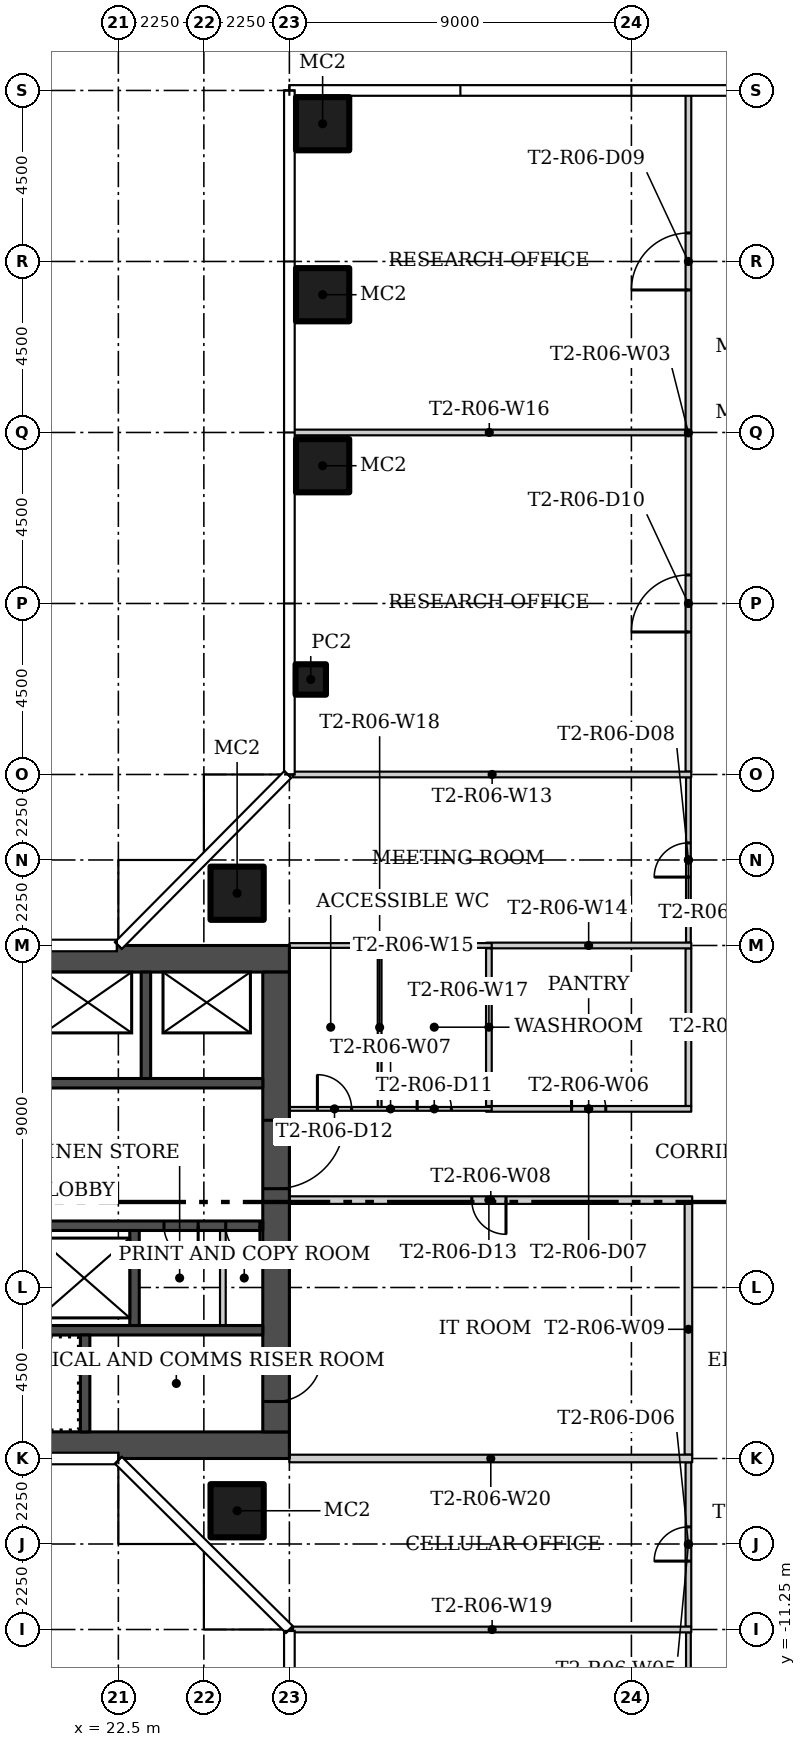
"""IFC4 building model, lengths in metres.
Left out: names, types, materials, properties, quantities, classifications, styles, units other than length and angle.
Written with IfcOpenShell. Run it as: python <this file> out.ifc"""

import sys

from ifc_helpers import new_model, si_unit, direction, frame, frame_2d, origin, origin_2d, place, context, subcontext, project, spatial, rectangle, hollow_rectangle, extrude, element, fill, save


model = new_model("IFC4")
c1 = context("Model", 3, precision=1e-05, world=origin(), true_north=direction((0.0, 1.0)))
c2 = subcontext(c1, "Body", "Model", "MODEL_VIEW")
j1 = project(units=[si_unit("LENGTHUNIT", "METRE"), si_unit("PLANEANGLEUNIT", "RADIAN")], contexts=[c1])
p1 = place(None, origin())
s1 = spatial("IfcSite", under=j1, at=p1, CompositionType="ELEMENT")
p2 = place(p1, origin())
s2 = spatial("IfcBuilding", under=s1, at=p2, CompositionType="ELEMENT")
p3 = place(p2, frame((0.0, 0.0, 61.5)))
s3 = spatial("IfcBuildingStorey", under=s2, at=p3, CompositionType="ELEMENT", Elevation=61.5)
for number, where in (
    (1, (25.625, 8.125, 0.0)),
    (2, (25.625, -8.125, 0.0)),
):
    element("IfcColumn", number, at=place(p3, frame(where)), inside=s3, PredefinedType="COLUMN", context=c2, shape_type="SweptSolid", body=[
        extrude(hollow_rectangle(XDim=1.4, YDim=1.4, WallThickness=0.05, at=origin_2d()), origin(), (0.0, 0.0, 1.0), 3.55),
    ])
p4 = place(p3, frame((27.562, 13.75, 0.0)))
e3 = element("IfcColumn", 3, at=p4, inside=s3, PredefinedType="COLUMN", context=c2, shape_type="SweptSolid", body=[
    extrude(hollow_rectangle(XDim=0.8, YDim=0.8, WallThickness=0.025, at=origin_2d()), origin(), (0.0, 0.0, 1.0), 3.55),
])
for number, where in (
    (4, (27.875, 19.375, 0.0)),
    (5, (27.875, 23.875, 0.0)),
    (6, (27.875, 28.375, 0.0)),
):
    element("IfcColumn", number, at=place(p3, frame(where)), inside=s3, PredefinedType="COLUMN", context=c2, shape_type="SweptSolid", body=[
        extrude(hollow_rectangle(XDim=1.4, YDim=1.4, WallThickness=0.05, at=origin_2d()), origin(), (0.0, 0.0, 1.0), 3.55),
    ])
p5 = place(p3, frame((37.5, 6.825, 0.0), z_axis=(0.0, 0.0, 1.0), x_axis=(0.0, 1.0, 0.0)))
e7 = element("IfcWall", 7, at=p5, inside=s3, PredefinedType="PARTITIONING", context=c2, shape_type="SweptSolid", body=[
    extrude(rectangle(XDim=4.35, YDim=0.125, at=frame_2d((2.175, 0.0))), origin(), (0.0, 0.0, 1.0), 3.55),
])
p6 = place(p5, frame((1.725, 0.0, 0.0)))
e8 = element("IfcOpeningElement", 8, at=p6, cuts=e7, PredefinedType="OPENING", context=c2, shape_type="SweptSolid", body=[
    extrude(rectangle(XDim=0.9, YDim=2.1, at=frame_2d((0.45, 1.05))), frame((0.0, 0.073, 0.0), z_axis=(0.0, -1.0, 0.0), x_axis=(1.0, 0.0, 0.0)), (0.0, 0.0, 1.0), 0.145),
])
p7 = place(p3, frame((37.5, -24.655, 0.0), z_axis=(0.0, 0.0, 1.0), x_axis=(0.0, 1.0, 0.0)))
e9 = element("IfcWall", 9, at=p7, inside=s3, PredefinedType="PARTITIONING", context=c2, shape_type="SweptSolid", body=[
    extrude(rectangle(XDim=13.33, YDim=0.125, at=frame_2d((6.665, 0.0))), origin(), (0.0, 0.0, 1.0), 3.55),
])
p8 = place(p7, frame((5.905, 0.0, 0.0)))
e10 = element("IfcOpeningElement", 10, at=p8, cuts=e9, PredefinedType="OPENING", context=c2, shape_type="SweptSolid", body=[
    extrude(rectangle(XDim=1.5, YDim=2.1, at=frame_2d((0.75, 1.05))), frame((0.0, 0.073, 0.0), z_axis=(0.0, -1.0, 0.0), x_axis=(1.0, 0.0, 0.0)), (0.0, 0.0, 1.0), 0.145),
])
p9 = place(p3, frame((37.5, 11.325, 0.0), z_axis=(0.0, 0.0, 1.0), x_axis=(0.0, 1.0, 0.0)))
e11 = element("IfcWall", 11, at=p9, inside=s3, PredefinedType="PARTITIONING", context=c2, shape_type="SweptSolid", body=[
    extrude(rectangle(XDim=17.83, YDim=0.15, at=frame_2d((8.915, 0.0))), origin(), (0.0, 0.0, 1.0), 3.55),
])
p10 = place(p9, frame((12.675, 0.0, 0.0)))
e12 = element("IfcOpeningElement", 12, at=p10, cuts=e11, PredefinedType="OPENING", context=c2, shape_type="SweptSolid", body=[
    extrude(rectangle(XDim=1.5, YDim=2.1, at=frame_2d((0.75, 1.05))), frame((0.0, 0.085, 0.0), z_axis=(0.0, -1.0, 0.0), x_axis=(1.0, 0.0, 0.0)), (0.0, 0.0, 1.0), 0.17),
])
p11 = place(p9, frame((3.675, 0.0, 0.0)))
e13 = element("IfcOpeningElement", 13, at=p11, cuts=e11, PredefinedType="OPENING", context=c2, shape_type="SweptSolid", body=[
    extrude(rectangle(XDim=1.5, YDim=2.1, at=frame_2d((0.75, 1.05))), frame((0.0, 0.085, 0.0), z_axis=(0.0, -1.0, 0.0), x_axis=(1.0, 0.0, 0.0)), (0.0, 0.0, 1.0), 0.17),
])
p12 = place(p3, frame((37.5, 2.525, 0.0), z_axis=(0.0, 0.0, 1.0), x_axis=(0.0, 1.0, 0.0)))
e14 = element("IfcWall", 14, at=p12, inside=s3, PredefinedType="PARTITIONING", context=c2, shape_type="SweptSolid", body=[
    extrude(rectangle(XDim=4.15, YDim=0.15, at=frame_2d((2.075, 0.0))), origin(), (0.0, 0.0, 1.0), 3.55),
])
p13 = place(p3, frame((37.5, -11.175, 0.0), z_axis=(0.0, 0.0, 1.0), x_axis=(0.0, 1.0, 0.0)))
e15 = element("IfcWall", 15, at=p13, inside=s3, PredefinedType="PARTITIONING", context=c2, shape_type="SweptSolid", body=[
    extrude(rectangle(XDim=4.325, YDim=0.15, at=frame_2d((2.163, 0.0))), origin(), (0.0, 0.0, 1.0), 3.55),
])
p14 = place(p13, frame((1.725, 0.0, 0.0)))
e16 = element("IfcOpeningElement", 16, at=p14, cuts=e15, PredefinedType="OPENING", context=c2, shape_type="SweptSolid", body=[
    extrude(rectangle(XDim=0.9, YDim=2.1, at=frame_2d((0.45, 1.05))), frame((0.0, 0.085, 0.0), z_axis=(0.0, -1.0, 0.0), x_axis=(1.0, 0.0, 0.0)), (0.0, 0.0, 1.0), 0.17),
])
p15 = place(p3, frame((32.175, 2.45, 0.0)))
e17 = element("IfcWall", 17, at=p15, inside=s3, PredefinedType="PARTITIONING", context=c2, shape_type="SweptSolid", body=[
    extrude(rectangle(XDim=5.4, YDim=0.15, at=frame_2d((2.7, 0.0))), origin(), (0.0, 0.0, 1.0), 3.55),
])
p16 = place(p15, frame((2.25, 0.0, 0.0)))
e18 = element("IfcOpeningElement", 18, at=p16, cuts=e17, PredefinedType="OPENING", context=c2, shape_type="SweptSolid", body=[
    extrude(rectangle(XDim=0.9, YDim=2.1, at=frame_2d((0.45, 1.05))), frame((0.0, 0.085, 0.0), z_axis=(0.0, -1.0, 0.0), x_axis=(1.0, 0.0, 0.0)), (0.0, 0.0, 1.0), 0.17),
])
p17 = place(p3, frame((27.0, 2.45, 0.0)))
e19 = element("IfcWall", 19, at=p17, inside=s3, PredefinedType="PARTITIONING", context=c2, shape_type="SweptSolid", body=[
    extrude(rectangle(XDim=5.325, YDim=0.1, at=frame_2d((2.663, 0.0))), origin(), (0.0, 0.0, 1.0), 3.55),
])
p18 = place(p17, frame((3.363, 0.0, 0.0)))
e20 = element("IfcOpeningElement", 20, at=p18, cuts=e19, PredefinedType="OPENING", context=c2, shape_type="SweptSolid", body=[
    extrude(rectangle(XDim=0.9, YDim=2.1, at=frame_2d((0.45, 1.05))), frame((0.0, 0.06, 0.0), z_axis=(0.0, -1.0, 0.0), x_axis=(1.0, 0.0, 0.0)), (0.0, 0.0, 1.0), 0.12),
])
p19 = place(p17, frame((0.738, 0.0, 0.0)))
e21 = element("IfcOpeningElement", 21, at=p19, cuts=e19, PredefinedType="OPENING", context=c2, shape_type="SweptSolid", body=[
    extrude(rectangle(XDim=0.9, YDim=2.1, at=frame_2d((0.45, 1.05))), frame((0.0, 0.06, 0.0), z_axis=(0.0, -1.0, 0.0), x_axis=(1.0, 0.0, 0.0)), (0.0, 0.0, 1.0), 0.12),
])
p20 = place(p3, frame((37.6, 0.05, 0.0), z_axis=(0.0, 0.0, 1.0), x_axis=(-1.0, 0.0, 0.0)))
e22 = element("IfcWall", 22, at=p20, inside=s3, PredefinedType="PARTITIONING", context=c2, shape_type="SweptSolid", body=[
    extrude(rectangle(XDim=10.6, YDim=0.2, at=frame_2d((5.3, 0.0))), origin(), (0.0, 0.0, 1.0), 3.55),
])
p21 = place(p20, frame((4.9, 0.0, 0.0)))
e23 = element("IfcOpeningElement", 23, at=p21, cuts=e22, PredefinedType="OPENING", context=c2, shape_type="SweptSolid", body=[
    extrude(rectangle(XDim=0.9, YDim=2.1, at=frame_2d((0.45, 1.05))), frame((0.0, 0.11, 0.0), z_axis=(0.0, -1.0, 0.0), x_axis=(1.0, 0.0, 0.0)), (0.0, 0.0, 1.0), 0.22),
])
p22 = place(p3, frame((37.5, -6.65, 0.0), z_axis=(0.0, 0.0, 1.0), x_axis=(0.0, 1.0, 0.0)))
e24 = element("IfcWall", 24, at=p22, inside=s3, PredefinedType="PARTITIONING", context=c2, shape_type="SweptSolid", body=[
    extrude(rectangle(XDim=6.6, YDim=0.2, at=frame_2d((3.3, 0.0))), origin(), (0.0, 0.0, 1.0), 3.55),
])
p23 = place(p3, frame((37.575, 11.25, 0.0), z_axis=(0.0, 0.0, 1.0), x_axis=(-1.0, 0.0, 0.0)))
e25 = element("IfcWall", 25, at=p23, inside=s3, PredefinedType="PARTITIONING", context=c2, shape_type="SweptSolid", body=[
    extrude(rectangle(XDim=10.48, YDim=0.15, at=frame_2d((5.24, 0.0))), origin(), (0.0, 0.0, 1.0), 3.55),
])
p24 = place(p3, frame((32.175, 6.75, 0.0)))
e26 = element("IfcWall", 26, at=p24, inside=s3, PredefinedType="PARTITIONING", context=c2, shape_type="SweptSolid", body=[
    extrude(rectangle(XDim=5.4, YDim=0.15, at=frame_2d((2.7, 0.0))), origin(), (0.0, 0.0, 1.0), 3.55),
])
p25 = place(p3, frame((27.0, 6.75, 0.0)))
e27 = element("IfcWall", 27, at=p25, inside=s3, PredefinedType="PARTITIONING", context=c2, shape_type="SweptSolid", body=[
    extrude(rectangle(XDim=5.325, YDim=0.125, at=frame_2d((2.663, 0.0))), origin(), (0.0, 0.0, 1.0), 3.55),
])
p26 = place(p3, frame((37.425, 20.25, 0.0), z_axis=(0.0, 0.0, 1.0), x_axis=(-1.0, 0.0, 0.0)))
e28 = element("IfcWall", 28, at=p26, inside=s3, PredefinedType="PARTITIONING", context=c2, shape_type="SweptSolid", body=[
    extrude(rectangle(XDim=10.33, YDim=0.15, at=frame_2d((5.165, 0.0))), origin(), (0.0, 0.0, 1.0), 3.55),
])
p27 = place(p3, frame((32.25, 6.675, 0.0), z_axis=(0.0, 0.0, 1.0), x_axis=(0.0, -1.0, 0.0)))
e29 = element("IfcWall", 29, at=p27, inside=s3, PredefinedType="PARTITIONING", context=c2, shape_type="SweptSolid", body=[
    extrude(rectangle(XDim=4.15, YDim=0.15, at=frame_2d((2.075, 0.0))), origin(), (0.0, 0.0, 1.0), 3.55),
])
p28 = place(p3, frame((29.375, 6.688, 0.0), z_axis=(0.0, 0.0, 1.0), x_axis=(0.0, -1.0, 0.0)))
e30 = element("IfcWall", 30, at=p28, inside=s3, PredefinedType="PARTITIONING", context=c2, shape_type="SweptSolid", body=[
    extrude(rectangle(XDim=4.187, YDim=0.1, at=frame_2d((2.094, 0.0))), origin(), (0.0, 0.0, 1.0), 3.55),
])
p29 = place(p3, frame((27.095, -11.25, 0.0)))
e31 = element("IfcWall", 31, at=p29, inside=s3, PredefinedType="PARTITIONING", context=c2, shape_type="SweptSolid", body=[
    extrude(rectangle(XDim=10.48, YDim=0.15, at=frame_2d((5.24, 0.0))), origin(), (0.0, 0.0, 1.0), 3.55),
])
p30 = place(p3, frame((37.6, -6.75, 0.0), z_axis=(0.0, 0.0, 1.0), x_axis=(-1.0, 0.0, 0.0)))
e32 = element("IfcWall", 32, at=p30, inside=s3, PredefinedType="PARTITIONING", context=c2, shape_type="SweptSolid", body=[
    extrude(rectangle(XDim=10.6, YDim=0.2, at=frame_2d((5.3, 0.0))), origin(), (0.0, 0.0, 1.0), 3.55),
])
for number, where in (
    (33, (13.5, -6.4, 0.0)),
    (34, (13.5, 6.4, 0.0)),
):
    element("IfcWall", number, at=place(p3, frame(where)), inside=s3, PredefinedType="SHEAR", context=c2, shape_type="SweptSolid", body=[
        extrude(rectangle(XDim=13.5, YDim=0.7, at=frame_2d((6.75, 0.0))), origin(), (0.0, 0.0, 1.0), 3.55),
    ])
p31 = place(p3, frame((26.65, 6.05, 0.0), z_axis=(0.0, 0.0, 1.0), x_axis=(0.0, -1.0, 0.0)))
e35 = element("IfcWall", 35, at=p31, inside=s3, PredefinedType="SHEAR", context=c2, shape_type="SweptSolid", body=[
    extrude(rectangle(XDim=12.1, YDim=0.7, at=frame_2d((6.05, 0.0))), origin(), (0.0, 0.0, 1.0), 3.55),
])
p32 = place(p31, frame((10.1, 0.0, 0.0)))
e36 = element("IfcOpeningElement", 36, at=p32, cuts=e35, PredefinedType="OPENING", context=c2, shape_type="SweptSolid", body=[
    extrude(rectangle(XDim=1.2, YDim=2.1, at=frame_2d((0.6, 1.05))), frame((0.0, 0.36, 0.0), z_axis=(0.0, -1.0, 0.0), x_axis=(1.0, 0.0, 0.0)), (0.0, 0.0, 1.0), 0.72),
])
p33 = place(p31, frame((3.9, 0.0, 0.0)))
e37 = element("IfcOpeningElement", 37, at=p33, cuts=e35, PredefinedType="OPENING", context=c2, shape_type="SweptSolid", body=[
    extrude(rectangle(XDim=1.8, YDim=2.4, at=frame_2d((0.9, 1.2))), frame((0.0, 0.36, 0.0), z_axis=(0.0, -1.0, 0.0), x_axis=(1.0, 0.0, 0.0)), (0.0, 0.0, 1.0), 0.72),
])
p34 = place(p3, frame((26.3, -3.375, 0.0), z_axis=(0.0, 0.0, 1.0), x_axis=(-1.0, 0.0, 0.0)))
e38 = element("IfcWall", 38, at=p34, inside=s3, PredefinedType="SHEAR", context=c2, shape_type="SweptSolid", body=[
    extrude(rectangle(XDim=12.1, YDim=0.25, at=frame_2d((6.05, 0.0))), origin(), (0.0, 0.0, 1.0), 3.55),
])
p35 = place(p34, frame((10.95, 0.0, 0.0)))
e39 = element("IfcOpeningElement", 39, at=p35, cuts=e38, PredefinedType="OPENING", context=c2, shape_type="SweptSolid", body=[
    extrude(rectangle(XDim=1.1, YDim=2.1, at=frame_2d((0.55, 1.05))), frame((0.0, 0.135, 0.0), z_axis=(0.0, -1.0, 0.0), x_axis=(1.0, 0.0, 0.0)), (0.0, 0.0, 1.0), 0.27),
])
p36 = place(p3, frame((21.625, -6.05, 0.0), z_axis=(0.0, 0.0, 1.0), x_axis=(0.0, 1.0, 0.0)))
e40 = element("IfcWall", 40, at=p36, inside=s3, PredefinedType="SHEAR", context=c2, shape_type="SweptSolid", body=[
    extrude(rectangle(XDim=2.55, YDim=0.25, at=frame_2d((1.275, 0.0))), origin(), (0.0, 0.0, 1.0), 3.55),
])
p37 = place(p3, frame((26.3, -0.625, 0.0), z_axis=(0.0, 0.0, 1.0), x_axis=(-1.0, 0.0, 0.0)))
e41 = element("IfcWall", 41, at=p37, inside=s3, PredefinedType="SHEAR", context=c2, shape_type="SweptSolid", body=[
    extrude(rectangle(XDim=12.1, YDim=0.25, at=frame_2d((6.05, 0.0))), origin(), (0.0, 0.0, 1.0), 3.55),
])
p38 = place(p37, frame((8.65, 0.0, 0.0)))
e42 = element("IfcOpeningElement", 42, at=p38, cuts=e41, PredefinedType="OPENING", context=c2, shape_type="SweptSolid", body=[
    extrude(rectangle(XDim=1.2, YDim=2.1, at=frame_2d((0.6, 1.05))), frame((0.0, 0.135, 0.0), z_axis=(0.0, -1.0, 0.0), x_axis=(1.0, 0.0, 0.0)), (0.0, 0.0, 1.0), 0.27),
])
p39 = place(p37, frame((1.7, 0.0, 0.0)))
e43 = element("IfcOpeningElement", 43, at=p39, cuts=e41, PredefinedType="OPENING", context=c2, shape_type="SweptSolid", body=[
    extrude(rectangle(XDim=0.9, YDim=2.1, at=frame_2d((0.45, 1.05))), frame((0.0, 0.135, 0.0), z_axis=(0.0, -1.0, 0.0), x_axis=(1.0, 0.0, 0.0)), (0.0, 0.0, 1.0), 0.27),
])
p40 = place(p37, frame((0.075, 0.0, 0.0)))
e44 = element("IfcOpeningElement", 44, at=p40, cuts=e41, PredefinedType="OPENING", context=c2, shape_type="SweptSolid", body=[
    extrude(rectangle(XDim=0.9, YDim=2.1, at=frame_2d((0.45, 1.05))), frame((0.0, 0.135, 0.0), z_axis=(0.0, -1.0, 0.0), x_axis=(1.0, 0.0, 0.0)), (0.0, 0.0, 1.0), 0.27),
])
p41 = place(p3, frame((22.925, -3.25, 0.0), z_axis=(0.0, 0.0, 1.0), x_axis=(0.0, 1.0, 0.0)))
e45 = element("IfcWall", 45, at=p41, inside=s3, PredefinedType="SHEAR", context=c2, shape_type="SweptSolid", body=[
    extrude(rectangle(XDim=2.5, YDim=0.25, at=frame_2d((1.25, 0.0))), origin(), (0.0, 0.0, 1.0), 3.55),
])
p42 = place(p3, frame((25.25, -3.25, 0.0), z_axis=(0.0, 0.0, 1.0), x_axis=(0.0, 1.0, 0.0)))
e46 = element("IfcWall", 46, at=p42, inside=s3, PredefinedType="PARTITIONING", context=c2, shape_type="SweptSolid", body=[
    extrude(rectangle(XDim=2.5, YDim=0.15, at=frame_2d((1.25, 0.0))), origin(), (0.0, 0.0, 1.0), 3.55),
])
p43 = place(p3, frame((14.2, 3.125, 0.0)))
e47 = element("IfcWall", 47, at=p43, inside=s3, PredefinedType="SHEAR", context=c2, shape_type="SweptSolid", body=[
    extrude(rectangle(XDim=12.1, YDim=0.25, at=frame_2d((6.05, 0.0))), origin(), (0.0, 0.0, 1.0), 3.55),
])
p44 = place(p43, frame((0.85, 0.0, 0.0)))
e48 = element("IfcOpeningElement", 48, at=p44, cuts=e47, PredefinedType="OPENING", context=c2, shape_type="SweptSolid", body=[
    extrude(rectangle(XDim=1.1, YDim=2.1, at=frame_2d((0.55, 1.05))), frame((0.0, 0.135, 0.0), z_axis=(0.0, -1.0, 0.0), x_axis=(1.0, 0.0, 0.0)), (0.0, 0.0, 1.0), 0.27),
])
p45 = place(p43, frame((3.9, 0.0, 0.0)))
e49 = element("IfcOpeningElement", 49, at=p45, cuts=e47, PredefinedType="OPENING", context=c2, shape_type="SweptSolid", body=[
    extrude(rectangle(XDim=1.1, YDim=2.1, at=frame_2d((0.55, 1.05))), frame((0.0, 0.135, 0.0), z_axis=(0.0, -1.0, 0.0), x_axis=(1.0, 0.0, 0.0)), (0.0, 0.0, 1.0), 0.27),
])
p46 = place(p3, frame((23.225, 3.25, 0.0), z_axis=(0.0, 0.0, 1.0), x_axis=(0.0, 1.0, 0.0)))
e50 = element("IfcWall", 50, at=p46, inside=s3, PredefinedType="SHEAR", context=c2, shape_type="SweptSolid", body=[
    extrude(rectangle(XDim=2.8, YDim=0.25, at=frame_2d((1.4, 0.0))), origin(), (0.0, 0.0, 1.0), 3.55),
])
p47 = place(p14, origin())
e51 = element("IfcDoor", 51, at=p47, inside=s3, OperationType="SINGLE_SWING_LEFT", PredefinedType="DOOR", context=c2, shape_type="SweptSolid", body=[
    extrude(rectangle(XDim=0.9, YDim=2.1, at=frame_2d((0.45, 1.05))), frame((0.0, 0.025, 0.0), z_axis=(0.0, -1.0, 0.0), x_axis=(1.0, 0.0, 0.0)), (0.0, 0.0, 1.0), 0.05),
])
fill(e16, e51)
p48 = place(p16, origin())
e52 = element("IfcDoor", 52, at=p48, inside=s3, OperationType="SINGLE_SWING_RIGHT", PredefinedType="DOOR", context=c2, shape_type="SweptSolid", body=[
    extrude(rectangle(XDim=0.9, YDim=2.1, at=frame_2d((0.45, 1.05))), frame((0.0, 0.025, 0.0), z_axis=(0.0, -1.0, 0.0), x_axis=(1.0, 0.0, 0.0)), (0.0, 0.0, 1.0), 0.05),
])
fill(e18, e52)
p49 = place(p6, origin())
e53 = element("IfcDoor", 53, at=p49, inside=s3, OperationType="SINGLE_SWING_LEFT", PredefinedType="DOOR", context=c2, shape_type="SweptSolid", body=[
    extrude(rectangle(XDim=0.9, YDim=2.1, at=frame_2d((0.45, 1.05))), frame((0.0, 0.025, 0.0), z_axis=(0.0, -1.0, 0.0), x_axis=(1.0, 0.0, 0.0)), (0.0, 0.0, 1.0), 0.05),
])
fill(e8, e53)
p50 = place(p10, origin())
e54 = element("IfcDoor", 54, at=p50, inside=s3, OperationType="DOUBLE_DOOR_SINGLE_SWING", PredefinedType="DOOR", context=c2, shape_type="SweptSolid", body=[
    extrude(rectangle(XDim=1.5, YDim=2.1, at=frame_2d((0.75, 1.05))), frame((0.0, 0.025, 0.0), z_axis=(0.0, -1.0, 0.0), x_axis=(1.0, 0.0, 0.0)), (0.0, 0.0, 1.0), 0.05),
])
fill(e12, e54)
p51 = place(p11, origin())
e55 = element("IfcDoor", 55, at=p51, inside=s3, OperationType="DOUBLE_DOOR_SINGLE_SWING", PredefinedType="DOOR", context=c2, shape_type="SweptSolid", body=[
    extrude(rectangle(XDim=1.5, YDim=2.1, at=frame_2d((0.75, 1.05))), frame((0.0, 0.025, 0.0), z_axis=(0.0, -1.0, 0.0), x_axis=(1.0, 0.0, 0.0)), (0.0, 0.0, 1.0), 0.05),
])
fill(e13, e55)
p52 = place(p18, origin())
e56 = element("IfcDoor", 56, at=p52, inside=s3, OperationType="SINGLE_SWING_RIGHT", PredefinedType="DOOR", context=c2, shape_type="SweptSolid", body=[
    extrude(rectangle(XDim=0.9, YDim=2.1, at=frame_2d((0.45, 1.05))), frame((0.0, 0.025, 0.0), z_axis=(0.0, -1.0, 0.0), x_axis=(1.0, 0.0, 0.0)), (0.0, 0.0, 1.0), 0.05),
])
fill(e20, e56)
p53 = place(p19, origin())
e57 = element("IfcDoor", 57, at=p53, inside=s3, OperationType="SINGLE_SWING_LEFT", PredefinedType="DOOR", context=c2, shape_type="SweptSolid", body=[
    extrude(rectangle(XDim=0.9, YDim=2.1, at=frame_2d((0.45, 1.05))), frame((0.0, 0.025, 0.0), z_axis=(0.0, -1.0, 0.0), x_axis=(1.0, 0.0, 0.0)), (0.0, 0.0, 1.0), 0.05),
])
fill(e21, e57)
p54 = place(p21, origin())
e58 = element("IfcDoor", 58, at=p54, inside=s3, OperationType="SINGLE_SWING_RIGHT", PredefinedType="DOOR", context=c2, shape_type="SweptSolid", body=[
    extrude(rectangle(XDim=0.9, YDim=2.1, at=frame_2d((0.45, 1.05))), frame((0.0, 0.025, 0.0), z_axis=(0.0, -1.0, 0.0), x_axis=(1.0, 0.0, 0.0)), (0.0, 0.0, 1.0), 0.05),
])
fill(e23, e58)
p55 = place(p32, origin())
e59 = element("IfcDoor", 59, at=p55, inside=s3, OperationType="SINGLE_SWING_RIGHT", PredefinedType="DOOR", context=c2, shape_type="SweptSolid", body=[
    extrude(rectangle(XDim=1.2, YDim=2.1, at=frame_2d((0.6, 1.05))), frame((0.0, 0.025, 0.0), z_axis=(0.0, -1.0, 0.0), x_axis=(1.0, 0.0, 0.0)), (0.0, 0.0, 1.0), 0.05),
])
fill(e36, e59)
p56 = place(p33, origin())
e60 = element("IfcDoor", 60, at=p56, inside=s3, OperationType="DOUBLE_DOOR_SINGLE_SWING", PredefinedType="DOOR", context=c2, shape_type="SweptSolid", body=[
    extrude(rectangle(XDim=1.8, YDim=2.4, at=frame_2d((0.9, 1.2))), frame((0.0, 0.025, 0.0), z_axis=(0.0, -1.0, 0.0), x_axis=(1.0, 0.0, 0.0)), (0.0, 0.0, 1.0), 0.05),
])
fill(e37, e60)
p57 = place(p39, origin())
e61 = element("IfcDoor", 61, at=p57, inside=s3, OperationType="SINGLE_SWING_LEFT", PredefinedType="DOOR", context=c2, shape_type="SweptSolid", body=[
    extrude(rectangle(XDim=0.9, YDim=2.1, at=frame_2d((0.45, 1.05))), frame((0.0, 0.025, 0.0), z_axis=(0.0, -1.0, 0.0), x_axis=(1.0, 0.0, 0.0)), (0.0, 0.0, 1.0), 0.05),
])
fill(e43, e61)
p58 = place(p40, origin())
e62 = element("IfcDoor", 62, at=p58, inside=s3, OperationType="SINGLE_SWING_LEFT", PredefinedType="DOOR", context=c2, shape_type="SweptSolid", body=[
    extrude(rectangle(XDim=0.9, YDim=2.1, at=frame_2d((0.45, 1.05))), frame((0.0, 0.025, 0.0), z_axis=(0.0, -1.0, 0.0), x_axis=(1.0, 0.0, 0.0)), (0.0, 0.0, 1.0), 0.05),
])
fill(e44, e62)
save(model, sys.argv[1])
